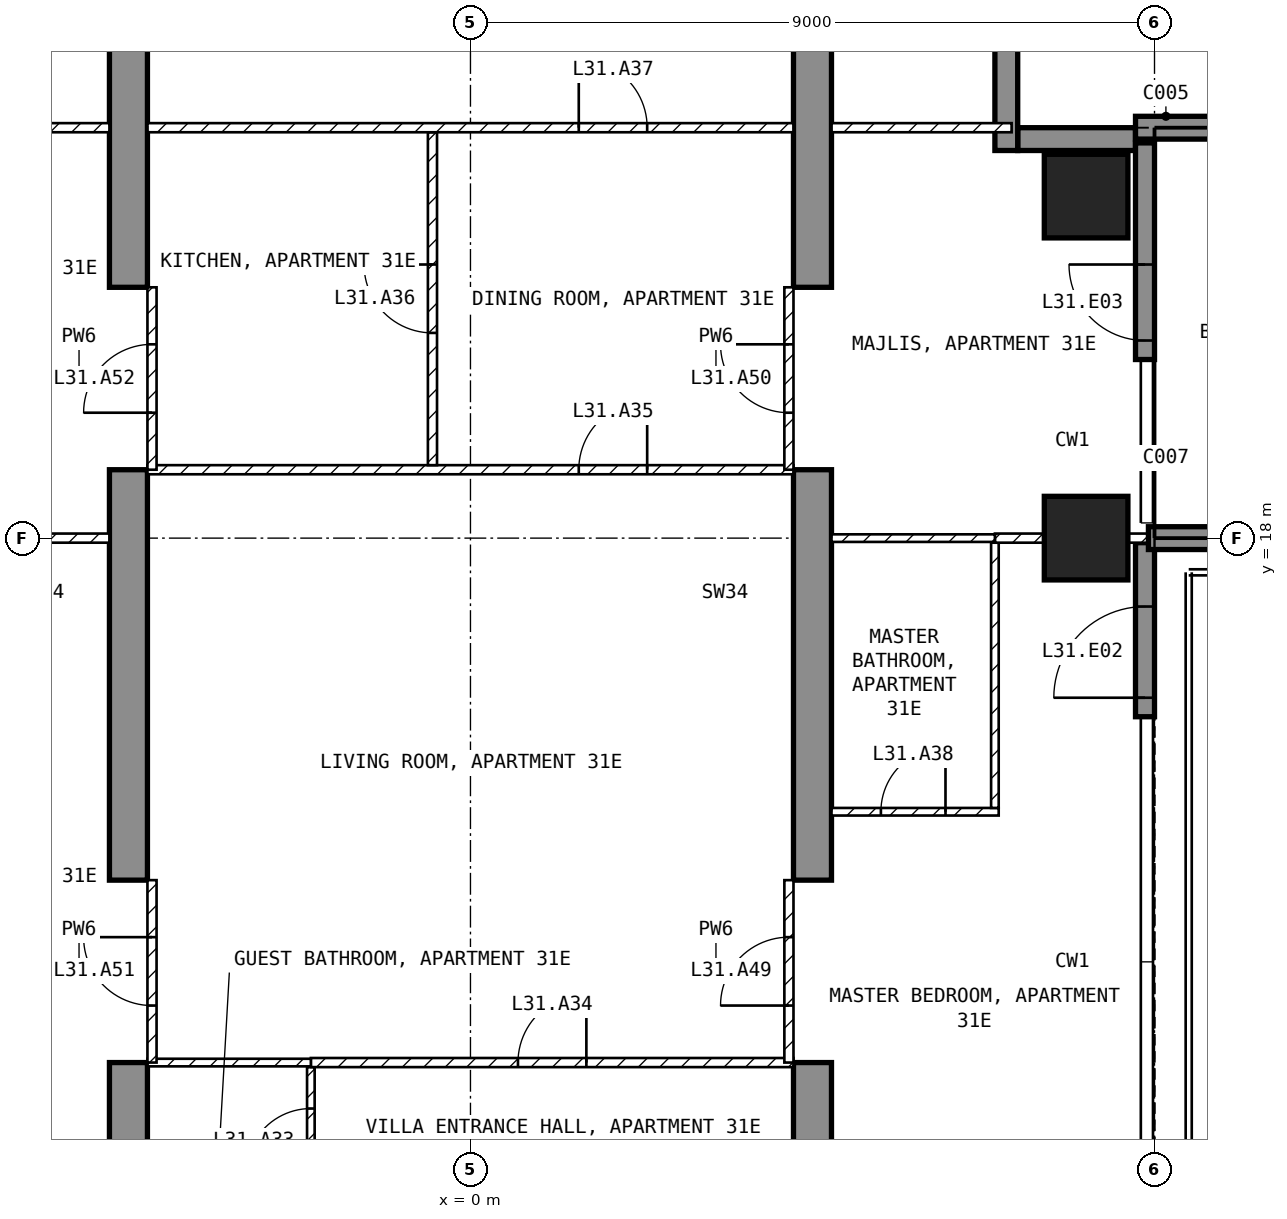
"""IFC4 building model, lengths in metres.
Left out: names, types, materials, properties, quantities, classifications, styles, units other than length and angle.
Written with IfcOpenShell. Run it as: python <this file> out.ifc"""

import sys

from ifc_helpers import new_model, si_unit, direction, frame, frame_2d, origin, origin_2d, place, context, subcontext, project, spatial, polyline, rectangle, outline, extrude, element, fill, save


model = new_model("IFC4")
c1 = context("Model", 3, precision=1e-05, world=origin(), true_north=direction((0.0, 1.0)))
c2 = subcontext(c1, "Body", "Model", "MODEL_VIEW")
j1 = project(units=[si_unit("LENGTHUNIT", "METRE"), si_unit("PLANEANGLEUNIT", "RADIAN")], contexts=[c1])
p1 = place(None, origin())
s1 = spatial("IfcSite", under=j1, at=p1, CompositionType="ELEMENT")
p2 = place(p1, origin())
s2 = spatial("IfcBuilding", under=s1, at=p2, CompositionType="ELEMENT")
p3 = place(p2, frame((0.0, 0.0, 130.4)))
s3 = spatial("IfcBuildingStorey", under=s2, at=p3, CompositionType="ELEMENT", Elevation=130.4)
for number, where, z_axis, x_axis in (
    (1, (8.1, 18.0, -0.25), (0.0, 0.0, 1.0), (1.0, 0.0, 0.0)),
    (2, (8.1, 22.5, -0.25), (0.0, 0.0, 1.0), (1.0, 0.0, 0.0)),
):
    element("IfcColumn", number, at=place(p3, frame(where, z_axis=z_axis, x_axis=x_axis)), inside=s3, PredefinedType="COLUMN", context=c2, shape_type="SweptSolid", body=[
        extrude(rectangle(XDim=1.1, YDim=1.1, at=origin_2d()), origin(), (0.0, 0.0, 1.0), 3.5),
    ])
for number, where, z_axis, x_axis in (
    (3, (-4.75, 9.0, -0.25), (1.0, 0.0, 0.0), (0.0, 1.0, 0.0)),
    (4, (4.25, 9.0, -0.25), (1.0, 0.0, 0.0), (0.0, 1.0, 0.0)),
):
    element("IfcWall", number, at=place(p3, frame(where, z_axis=z_axis, x_axis=x_axis)), inside=s3, PredefinedType="SHEAR", context=c2, shape_type="SweptSolid", body=[
        extrude(outline(polyline([(0.0, 0.0), (2.1, 0.0), (2.1, 2.65), (4.5, 2.65), (4.5, 0.0), (9.9, 0.0), (9.9, 2.65), (12.3, 2.65), (12.3, 0.0), (16.55, 0.0), (16.55, 3.5), (0.0, 3.5), (0.0, 0.0)])), origin(), (0.0, 0.0, 1.0), 0.5),
    ])
p4 = place(p3, frame((8.875, 15.65, 0.0), z_axis=(0.0, 0.0, 1.0), x_axis=(0.0, 1.0, 0.0)))
e5 = element("IfcWall", 5, at=p4, inside=s3, PredefinedType="SOLIDWALL", context=c2, shape_type="SweptSolid", body=[
    extrude(rectangle(XDim=2.29, YDim=0.25, at=frame_2d((1.145, 0.0))), origin(), (0.0, 0.0, 1.0), 3.25),
])
p5 = place(p4, frame((0.25, 0.0, 0.0)))
e6 = element("IfcOpeningElement", 6, at=p5, cuts=e5, PredefinedType="OPENING", context=c2, shape_type="SweptSolid", body=[
    extrude(rectangle(XDim=1.2, YDim=2.4, at=frame_2d((0.6, 1.2))), frame((0.0, 0.135, 0.0), z_axis=(0.0, -1.0, 0.0), x_axis=(1.0, 0.0, 0.0)), (0.0, 0.0, 1.0), 0.27),
])
p6 = place(p3, frame((8.875, 20.35, 0.0), z_axis=(0.0, 0.0, 1.0), x_axis=(0.0, 1.0, 0.0)))
e7 = element("IfcWall", 7, at=p6, inside=s3, PredefinedType="SOLIDWALL", context=c2, shape_type="SweptSolid", body=[
    extrude(rectangle(XDim=2.85, YDim=0.25, at=frame_2d((1.425, 0.0))), origin(), (0.0, 0.0, 1.0), 3.25),
])
p7 = place(p6, frame((0.25, 0.0, 0.0)))
e8 = element("IfcOpeningElement", 8, at=p7, cuts=e7, PredefinedType="OPENING", context=c2, shape_type="SweptSolid", body=[
    extrude(rectangle(XDim=1.0, YDim=2.4, at=frame_2d((0.5, 1.2))), frame((0.0, 0.135, 0.0), z_axis=(0.0, -1.0, 0.0), x_axis=(1.0, 0.0, 0.0)), (0.0, 0.0, 1.0), 0.27),
])
p8 = place(p3, frame((8.75, 23.25, 0.0), z_axis=(0.0, 0.0, 1.0), x_axis=(-1.0, 0.0, 0.0)))
e9 = element("IfcWall", 9, at=p8, inside=s3, PredefinedType="SOLIDWALL", context=c2, shape_type="SweptSolid", body=[
    extrude(rectangle(XDim=1.55, YDim=0.3, at=frame_2d((0.775, 0.0))), origin(), (0.0, 0.0, 1.0), 3.25),
])
p9 = place(p3, frame((7.05, 23.1, 0.0), z_axis=(0.0, 0.0, 1.0), x_axis=(0.0, 1.0, 0.0)))
e10 = element("IfcWall", 10, at=p9, inside=s3, PredefinedType="SOLIDWALL", context=c2, shape_type="SweptSolid", body=[
    extrude(rectangle(XDim=1.8, YDim=0.3, at=frame_2d((0.9, 0.0))), origin(), (0.0, 0.0, 1.0), 3.25),
])
p10 = place(p3, frame((8.92, 18.0, 0.0), z_axis=(0.0, 0.0, 1.0), x_axis=(1.0, 0.0, 0.0)))
e11 = element("IfcWall", 11, at=p10, inside=s3, PredefinedType="SOLIDWALL", context=c2, shape_type="SweptSolid", body=[
    extrude(rectangle(XDim=2.82, YDim=0.3, at=frame_2d((1.41, 0.0))), origin(), (0.0, 0.0, 1.0), 3.25),
])
p11 = place(p3, frame((8.75, 23.4, 0.0), z_axis=(0.0, 0.0, 1.0), x_axis=(1.0, 0.0, 0.0)))
e12 = element("IfcWall", 12, at=p11, inside=s3, PredefinedType="SOLIDWALL", context=c2, shape_type="SweptSolid", body=[
    extrude(rectangle(XDim=2.95, YDim=0.3, at=frame_2d((1.475, 0.0))), origin(), (0.0, 0.0, 1.0), 3.25),
])
p12 = place(p3, frame((-2.1, 9.1, 0.0), z_axis=(0.0, 0.0, 1.0), x_axis=(0.0, 1.0, 0.0)))
e13 = element("IfcWall", 13, at=p12, inside=s3, PredefinedType="PARTITIONING", context=c2, shape_type="SweptSolid", body=[
    extrude(rectangle(XDim=1.94, YDim=0.1, at=frame_2d((0.97, 0.0))), origin(), (0.0, 0.0, 1.0), 3.25),
])
p13 = place(p12, frame((0.545, 0.0, 0.0)))
e14 = element("IfcOpeningElement", 14, at=p13, cuts=e13, PredefinedType="OPENING", context=c2, shape_type="SweptSolid", body=[
    extrude(rectangle(XDim=0.85, YDim=2.1, at=frame_2d((0.425, 1.05))), frame((0.0, 0.06, 0.0), z_axis=(0.0, -1.0, 0.0), x_axis=(1.0, 0.0, 0.0)), (0.0, 0.0, 1.0), 0.12),
])
p14 = place(p3, frame((-2.1, 11.1, 0.0), z_axis=(0.0, 0.0, 1.0), x_axis=(1.0, 0.0, 0.0)))
e15 = element("IfcWall", 15, at=p14, inside=s3, PredefinedType="PARTITIONING", context=c2, shape_type="SweptSolid", body=[
    extrude(rectangle(XDim=6.35, YDim=0.12, at=frame_2d((3.175, 0.0))), origin(), (0.0, 0.0, 1.0), 3.25),
])
p15 = place(p14, frame((2.725, 0.0, 0.0)))
e16 = element("IfcOpeningElement", 16, at=p15, cuts=e15, PredefinedType="OPENING", context=c2, shape_type="SweptSolid", body=[
    extrude(rectangle(XDim=0.9, YDim=2.1, at=frame_2d((0.45, 1.05))), frame((0.0, 0.07, 0.0), z_axis=(0.0, -1.0, 0.0), x_axis=(1.0, 0.0, 0.0)), (0.0, 0.0, 1.0), 0.14),
])
p16 = place(p3, frame((-4.25, 11.1, 0.0), z_axis=(0.0, 0.0, 1.0), x_axis=(1.0, 0.0, 0.0)))
e17 = element("IfcWall", 17, at=p16, inside=s3, PredefinedType="PARTITIONING", context=c2, shape_type="SweptSolid", body=[
    extrude(rectangle(XDim=2.15, YDim=0.1, at=frame_2d((1.075, 0.0))), origin(), (0.0, 0.0, 1.0), 3.25),
])
p17 = place(p3, frame((-4.25, 18.9, 0.0), z_axis=(0.0, 0.0, 1.0), x_axis=(1.0, 0.0, 0.0)))
e18 = element("IfcWall", 18, at=p17, inside=s3, PredefinedType="PARTITIONING", context=c2, shape_type="SweptSolid", body=[
    extrude(rectangle(XDim=8.5, YDim=0.12, at=frame_2d((4.25, 0.0))), origin(), (0.0, 0.0, 1.0), 3.25),
])
p18 = place(p17, frame((5.675, 0.0, 0.0)))
e19 = element("IfcOpeningElement", 19, at=p18, cuts=e18, PredefinedType="OPENING", context=c2, shape_type="SweptSolid", body=[
    extrude(rectangle(XDim=0.9, YDim=2.1, at=frame_2d((0.45, 1.05))), frame((0.0, 0.07, 0.0), z_axis=(0.0, -1.0, 0.0), x_axis=(1.0, 0.0, 0.0)), (0.0, 0.0, 1.0), 0.14),
])
p19 = place(p3, frame((-0.5, 18.96, 0.0), z_axis=(0.0, 0.0, 1.0), x_axis=(0.0, 1.0, 0.0)))
e20 = element("IfcWall", 20, at=p19, inside=s3, PredefinedType="PARTITIONING", context=c2, shape_type="SweptSolid", body=[
    extrude(rectangle(XDim=4.38, YDim=0.12, at=frame_2d((2.19, 0.0))), origin(), (0.0, 0.0, 1.0), 3.25),
])
p20 = place(p19, frame((1.74, 0.0, 0.0)))
e21 = element("IfcOpeningElement", 21, at=p20, cuts=e20, PredefinedType="OPENING", context=c2, shape_type="SweptSolid", body=[
    extrude(rectangle(XDim=0.9, YDim=2.1, at=frame_2d((0.45, 1.05))), frame((0.0, 0.07, 0.0), z_axis=(0.0, -1.0, 0.0), x_axis=(1.0, 0.0, 0.0)), (0.0, 0.0, 1.0), 0.14),
])
p21 = place(p3, frame((-4.25, 23.4, 0.0), z_axis=(0.0, 0.0, 1.0), x_axis=(1.0, 0.0, 0.0)))
e22 = element("IfcWall", 22, at=p21, inside=s3, PredefinedType="PARTITIONING", context=c2, shape_type="SweptSolid", body=[
    extrude(rectangle(XDim=8.5, YDim=0.12, at=frame_2d((4.25, 0.0))), origin(), (0.0, 0.0, 1.0), 3.25),
])
p22 = place(p21, frame((5.675, 0.0, 0.0)))
e23 = element("IfcOpeningElement", 23, at=p22, cuts=e22, PredefinedType="OPENING", context=c2, shape_type="SweptSolid", body=[
    extrude(rectangle(XDim=0.9, YDim=2.1, at=frame_2d((0.45, 1.05))), frame((0.0, 0.07, 0.0), z_axis=(0.0, -1.0, 0.0), x_axis=(1.0, 0.0, 0.0)), (0.0, 0.0, 1.0), 0.14),
])
p23 = place(p3, frame((4.75, 14.4, 0.0), z_axis=(0.0, 0.0, 1.0), x_axis=(1.0, 0.0, 0.0)))
e24 = element("IfcWall", 24, at=p23, inside=s3, PredefinedType="PARTITIONING", context=c2, shape_type="SweptSolid", body=[
    extrude(rectangle(XDim=2.2, YDim=0.1, at=frame_2d((1.1, 0.0))), origin(), (0.0, 0.0, 1.0), 3.25),
])
p24 = place(p23, frame((0.65, 0.0, 0.0)))
e25 = element("IfcOpeningElement", 25, at=p24, cuts=e24, PredefinedType="OPENING", context=c2, shape_type="SweptSolid", body=[
    extrude(rectangle(XDim=0.85, YDim=2.1, at=frame_2d((0.425, 1.05))), frame((0.0, 0.06, 0.0), z_axis=(0.0, -1.0, 0.0), x_axis=(1.0, 0.0, 0.0)), (0.0, 0.0, 1.0), 0.12),
])
p25 = place(p3, frame((6.9, 14.45, 0.0), z_axis=(0.0, 0.0, 1.0), x_axis=(0.0, 1.0, 0.0)))
e26 = element("IfcWall", 26, at=p25, inside=s3, PredefinedType="PARTITIONING", context=c2, shape_type="SweptSolid", body=[
    extrude(rectangle(XDim=3.49, YDim=0.1, at=frame_2d((1.745, 0.0))), origin(), (0.0, 0.0, 1.0), 3.25),
])
p26 = place(p3, frame((6.9, 18.0, 0.0), z_axis=(0.0, 0.0, 1.0), x_axis=(1.0, 0.0, 0.0)))
e27 = element("IfcWall", 27, at=p26, inside=s3, PredefinedType="PARTITIONING", context=c2, shape_type="SweptSolid", body=[
    extrude(rectangle(XDim=2.02, YDim=0.12, at=frame_2d((1.01, 0.0))), origin(), (0.0, 0.0, 1.0), 2.414),
])
p27 = place(p3, frame((4.75, 18.0, 0.0), z_axis=(0.0, 0.0, 1.0), x_axis=(1.0, 0.0, 0.0)))
e28 = element("IfcWall", 28, at=p27, inside=s3, PredefinedType="PARTITIONING", context=c2, shape_type="SweptSolid", body=[
    extrude(rectangle(XDim=2.15, YDim=0.1, at=frame_2d((1.075, 0.0))), origin(), (0.0, 0.0, 1.0), 2.414),
])
p28 = place(p3, frame((4.75, 23.4, 0.0), z_axis=(0.0, 0.0, 1.0), x_axis=(1.0, 0.0, 0.0)))
e29 = element("IfcWall", 29, at=p28, inside=s3, PredefinedType="PARTITIONING", context=c2, shape_type="SweptSolid", body=[
    extrude(rectangle(XDim=2.37, YDim=0.12, at=frame_2d((1.185, 0.0))), origin(), (0.0, 0.0, 1.0), 3.25),
])
p29 = place(p3, frame((-8.92, 18.0, 0.0), z_axis=(0.0, 0.0, 1.0), x_axis=(1.0, 0.0, 0.0)))
e30 = element("IfcWall", 30, at=p29, inside=s3, PredefinedType="PARTITIONING", context=c2, shape_type="SweptSolid", body=[
    extrude(rectangle(XDim=4.17, YDim=0.12, at=frame_2d((2.085, 0.0))), origin(), (0.0, 0.0, 1.0), 2.414),
])
p30 = place(p3, frame((-7.12, 23.4, 0.0), z_axis=(0.0, 0.0, 1.0), x_axis=(1.0, 0.0, 0.0)))
e31 = element("IfcWall", 31, at=p30, inside=s3, PredefinedType="PARTITIONING", context=c2, shape_type="SweptSolid", body=[
    extrude(rectangle(XDim=2.37, YDim=0.12, at=frame_2d((1.185, 0.0))), origin(), (0.0, 0.0, 1.0), 3.25),
])
p31 = place(p3, frame((4.19, 11.1, 0.0), z_axis=(0.0, 0.0, 1.0), x_axis=(0.0, 1.0, 0.0)))
e32 = element("IfcWall", 32, at=p31, inside=s3, PredefinedType="PARTITIONING", context=c2, shape_type="SweptSolid", body=[
    extrude(rectangle(XDim=2.4, YDim=0.12, at=frame_2d((1.2, 0.0))), origin(), (0.0, 0.0, 1.0), 2.4),
])
p32 = place(p31, frame((0.75, 0.0, 0.0)))
e33 = element("IfcOpeningElement", 33, at=p32, cuts=e32, PredefinedType="OPENING", context=c2, shape_type="SweptSolid", body=[
    extrude(rectangle(XDim=0.9, YDim=2.1, at=frame_2d((0.45, 1.05))), frame((0.0, 0.07, 0.0), z_axis=(0.0, -1.0, 0.0), x_axis=(1.0, 0.0, 0.0)), (0.0, 0.0, 1.0), 0.14),
])
p33 = place(p3, frame((4.19, 18.9, 0.0), z_axis=(0.0, 0.0, 1.0), x_axis=(0.0, 1.0, 0.0)))
e34 = element("IfcWall", 34, at=p33, inside=s3, PredefinedType="PARTITIONING", context=c2, shape_type="SweptSolid", body=[
    extrude(rectangle(XDim=2.4, YDim=0.12, at=frame_2d((1.2, 0.0))), origin(), (0.0, 0.0, 1.0), 2.4),
])
p34 = place(p33, frame((0.75, 0.0, 0.0)))
e35 = element("IfcOpeningElement", 35, at=p34, cuts=e34, PredefinedType="OPENING", context=c2, shape_type="SweptSolid", body=[
    extrude(rectangle(XDim=0.9, YDim=2.1, at=frame_2d((0.45, 1.05))), frame((0.0, 0.07, 0.0), z_axis=(0.0, -1.0, 0.0), x_axis=(1.0, 0.0, 0.0)), (0.0, 0.0, 1.0), 0.14),
])
p35 = place(p3, frame((-4.19, 11.1, 0.0), z_axis=(0.0, 0.0, 1.0), x_axis=(0.0, 1.0, 0.0)))
e36 = element("IfcWall", 36, at=p35, inside=s3, PredefinedType="PARTITIONING", context=c2, shape_type="SweptSolid", body=[
    extrude(rectangle(XDim=2.4, YDim=0.12, at=frame_2d((1.2, 0.0))), origin(), (0.0, 0.0, 1.0), 2.4),
])
p36 = place(p35, frame((0.75, 0.0, 0.0)))
e37 = element("IfcOpeningElement", 37, at=p36, cuts=e36, PredefinedType="OPENING", context=c2, shape_type="SweptSolid", body=[
    extrude(rectangle(XDim=0.9, YDim=2.1, at=frame_2d((0.45, 1.05))), frame((0.0, 0.07, 0.0), z_axis=(0.0, -1.0, 0.0), x_axis=(1.0, 0.0, 0.0)), (0.0, 0.0, 1.0), 0.14),
])
p37 = place(p3, frame((-4.19, 18.9, 0.0), z_axis=(0.0, 0.0, 1.0), x_axis=(0.0, 1.0, 0.0)))
e38 = element("IfcWall", 38, at=p37, inside=s3, PredefinedType="PARTITIONING", context=c2, shape_type="SweptSolid", body=[
    extrude(rectangle(XDim=2.4, YDim=0.12, at=frame_2d((1.2, 0.0))), origin(), (0.0, 0.0, 1.0), 2.4),
])
p38 = place(p37, frame((0.75, 0.0, 0.0)))
e39 = element("IfcOpeningElement", 39, at=p38, cuts=e38, PredefinedType="OPENING", context=c2, shape_type="SweptSolid", body=[
    extrude(rectangle(XDim=0.9, YDim=2.1, at=frame_2d((0.45, 1.05))), frame((0.0, 0.07, 0.0), z_axis=(0.0, -1.0, 0.0), x_axis=(1.0, 0.0, 0.0)), (0.0, 0.0, 1.0), 0.14),
])
p39 = place(p5, origin())
e40 = element("IfcDoor", 40, at=p39, inside=s3, OperationType="SINGLE_SWING_LEFT", PredefinedType="DOOR", context=c2, shape_type="SweptSolid", body=[
    extrude(rectangle(XDim=1.2, YDim=2.4, at=frame_2d((0.6, 1.2))), frame((0.0, 0.025, 0.0), z_axis=(0.0, -1.0, 0.0), x_axis=(1.0, 0.0, 0.0)), (0.0, 0.0, 1.0), 0.05),
])
fill(e6, e40)
p40 = place(p7, origin())
e41 = element("IfcDoor", 41, at=p40, inside=s3, OperationType="SINGLE_SWING_RIGHT", PredefinedType="DOOR", context=c2, shape_type="SweptSolid", body=[
    extrude(rectangle(XDim=1.0, YDim=2.4, at=frame_2d((0.5, 1.2))), frame((0.0, 0.025, 0.0), z_axis=(0.0, -1.0, 0.0), x_axis=(1.0, 0.0, 0.0)), (0.0, 0.0, 1.0), 0.05),
])
fill(e8, e41)
p41 = place(p13, origin())
e42 = element("IfcDoor", 42, at=p41, inside=s3, OperationType="SINGLE_SWING_LEFT", PredefinedType="DOOR", context=c2, shape_type="SweptSolid", body=[
    extrude(rectangle(XDim=0.85, YDim=2.1, at=frame_2d((0.425, 1.05))), frame((0.0, 0.025, 0.0), z_axis=(0.0, -1.0, 0.0), x_axis=(1.0, 0.0, 0.0)), (0.0, 0.0, 1.0), 0.05),
])
fill(e14, e42)
p42 = place(p15, origin())
e43 = element("IfcDoor", 43, at=p42, inside=s3, OperationType="SINGLE_SWING_RIGHT", PredefinedType="DOOR", context=c2, shape_type="SweptSolid", body=[
    extrude(rectangle(XDim=0.9, YDim=2.1, at=frame_2d((0.45, 1.05))), frame((0.0, 0.025, 0.0), z_axis=(0.0, -1.0, 0.0), x_axis=(1.0, 0.0, 0.0)), (0.0, 0.0, 1.0), 0.05),
])
fill(e16, e43)
p43 = place(p18, origin())
e44 = element("IfcDoor", 44, at=p43, inside=s3, OperationType="SINGLE_SWING_RIGHT", PredefinedType="DOOR", context=c2, shape_type="SweptSolid", body=[
    extrude(rectangle(XDim=0.9, YDim=2.1, at=frame_2d((0.45, 1.05))), frame((0.0, 0.025, 0.0), z_axis=(0.0, -1.0, 0.0), x_axis=(1.0, 0.0, 0.0)), (0.0, 0.0, 1.0), 0.05),
])
fill(e19, e44)
p44 = place(p20, origin())
e45 = element("IfcDoor", 45, at=p44, inside=s3, OperationType="SINGLE_SWING_RIGHT", PredefinedType="DOOR", context=c2, shape_type="SweptSolid", body=[
    extrude(rectangle(XDim=0.9, YDim=2.1, at=frame_2d((0.45, 1.05))), frame((0.0, 0.025, 0.0), z_axis=(0.0, -1.0, 0.0), x_axis=(1.0, 0.0, 0.0)), (0.0, 0.0, 1.0), 0.05),
])
fill(e21, e45)
p45 = place(p22, origin())
e46 = element("IfcDoor", 46, at=p45, inside=s3, OperationType="SINGLE_SWING_LEFT", PredefinedType="DOOR", context=c2, shape_type="SweptSolid", body=[
    extrude(rectangle(XDim=0.9, YDim=2.1, at=frame_2d((0.45, 1.05))), frame((0.0, 0.025, 0.0), z_axis=(0.0, -1.0, 0.0), x_axis=(1.0, 0.0, 0.0)), (0.0, 0.0, 1.0), 0.05),
])
fill(e23, e46)
p46 = place(p24, origin())
e47 = element("IfcDoor", 47, at=p46, inside=s3, OperationType="SINGLE_SWING_RIGHT", PredefinedType="DOOR", context=c2, shape_type="SweptSolid", body=[
    extrude(rectangle(XDim=0.85, YDim=2.1, at=frame_2d((0.425, 1.05))), frame((0.0, 0.025, 0.0), z_axis=(0.0, -1.0, 0.0), x_axis=(1.0, 0.0, 0.0)), (0.0, 0.0, 1.0), 0.05),
])
fill(e25, e47)
p47 = place(p32, origin())
e48 = element("IfcDoor", 48, at=p47, inside=s3, OperationType="SINGLE_SWING_LEFT", PredefinedType="DOOR", context=c2, shape_type="SweptSolid", body=[
    extrude(rectangle(XDim=0.9, YDim=2.1, at=frame_2d((0.45, 1.05))), frame((0.0, 0.025, 0.0), z_axis=(0.0, -1.0, 0.0), x_axis=(1.0, 0.0, 0.0)), (0.0, 0.0, 1.0), 0.05),
])
fill(e33, e48)
p48 = place(p34, origin())
e49 = element("IfcDoor", 49, at=p48, inside=s3, OperationType="SINGLE_SWING_RIGHT", PredefinedType="DOOR", context=c2, shape_type="SweptSolid", body=[
    extrude(rectangle(XDim=0.9, YDim=2.1, at=frame_2d((0.45, 1.05))), frame((0.0, 0.025, 0.0), z_axis=(0.0, -1.0, 0.0), x_axis=(1.0, 0.0, 0.0)), (0.0, 0.0, 1.0), 0.05),
])
fill(e35, e49)
p49 = place(p36, origin())
e50 = element("IfcDoor", 50, at=p49, inside=s3, OperationType="SINGLE_SWING_RIGHT", PredefinedType="DOOR", context=c2, shape_type="SweptSolid", body=[
    extrude(rectangle(XDim=0.9, YDim=2.1, at=frame_2d((0.45, 1.05))), frame((0.0, 0.025, 0.0), z_axis=(0.0, -1.0, 0.0), x_axis=(1.0, 0.0, 0.0)), (0.0, 0.0, 1.0), 0.05),
])
fill(e37, e50)
p50 = place(p38, origin())
e51 = element("IfcDoor", 51, at=p50, inside=s3, OperationType="SINGLE_SWING_LEFT", PredefinedType="DOOR", context=c2, shape_type="SweptSolid", body=[
    extrude(rectangle(XDim=0.9, YDim=2.1, at=frame_2d((0.45, 1.05))), frame((0.0, 0.025, 0.0), z_axis=(0.0, -1.0, 0.0), x_axis=(1.0, 0.0, 0.0)), (0.0, 0.0, 1.0), 0.05),
])
fill(e39, e51)
save(model, sys.argv[1])
